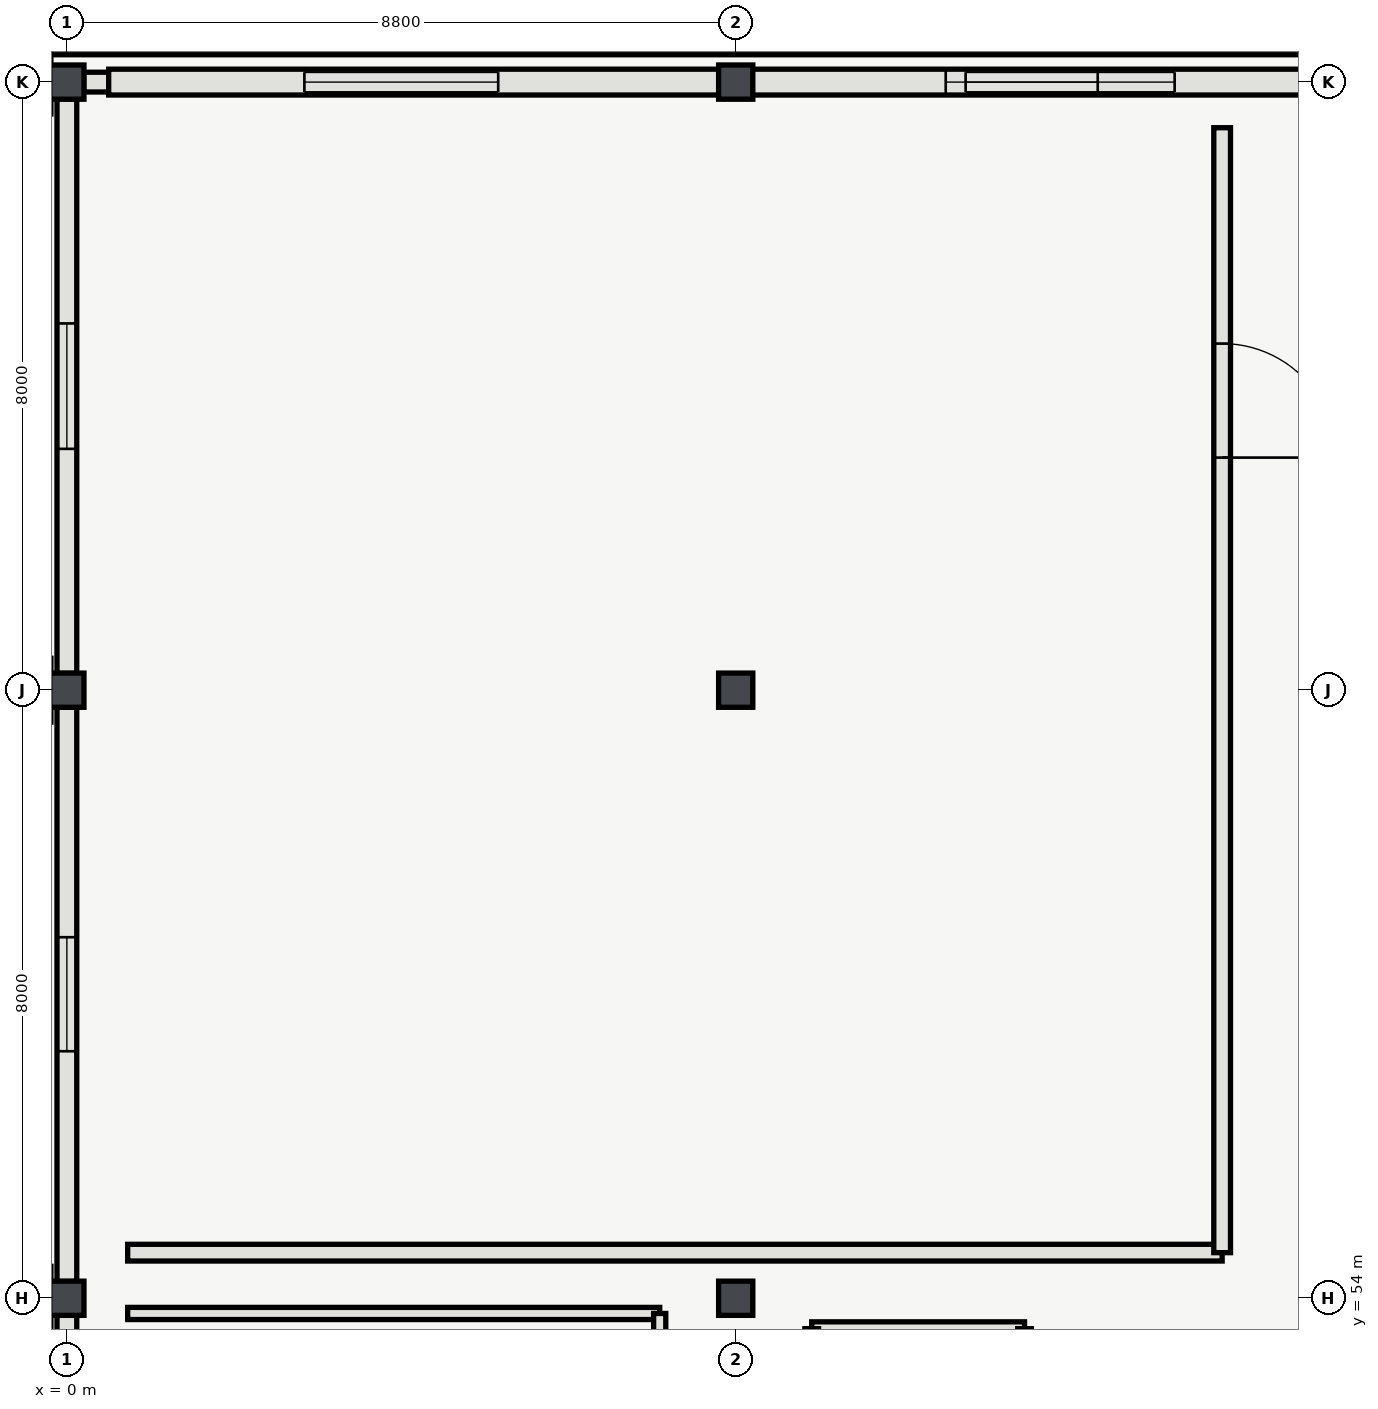
"""IFC4 building model, lengths in metres.
Left out: names, types, materials, properties, quantities, classifications, styles, units other than length and angle.
Written with IfcOpenShell. Run it as: python <this file> out.ifc"""

import sys

from ifc_helpers import new_model, si_unit, direction, frame, frame_2d, origin, origin_2d, place, context, subcontext, project, spatial, polyline, rectangle, hollow_rectangle, outline, extrude, element, fill, save


model = new_model("IFC4")
c1 = context("Model", 3, precision=1e-05, world=origin(), true_north=direction((0.0, 1.0)))
c2 = subcontext(c1, "Body", "Model", "MODEL_VIEW")
j1 = project(units=[si_unit("LENGTHUNIT", "METRE"), si_unit("PLANEANGLEUNIT", "RADIAN")], contexts=[c1])
p1 = place(None, origin())
s1 = spatial("IfcSite", under=j1, at=p1, CompositionType="ELEMENT")
p2 = place(p1, origin())
s2 = spatial("IfcBuilding", under=s1, at=p2, CompositionType="ELEMENT")
p3 = place(p2, frame((0.0, 0.0, 41.4)))
s3 = spatial("IfcBuildingStorey", under=s2, at=p3, CompositionType="ELEMENT", Elevation=41.4)
for number, where, z_axis, x_axis in (
    (1, (0.0, 54.0, 0.0), (0.0, 0.0, 1.0), (1.0, 0.0, 0.0)),
    (2, (0.0, 62.0, 0.0), (0.0, 0.0, 1.0), (1.0, 0.0, 0.0)),
    (3, (0.0, 70.0, 0.0), (0.0, 0.0, 1.0), (1.0, 0.0, 0.0)),
    (4, (8.8, 54.0, 0.0), (0.0, 0.0, 1.0), (1.0, 0.0, 0.0)),
    (5, (8.8, 62.0, 0.0), (0.0, 0.0, 1.0), (1.0, 0.0, 0.0)),
    (6, (8.8, 70.0, 0.0), (0.0, 0.0, 1.0), (1.0, 0.0, 0.0)),
):
    element("IfcColumn", number, at=place(p3, frame(where, z_axis=z_axis, x_axis=x_axis)), inside=s3, PredefinedType="COLUMN", context=c2, shape_type="SweptSolid", body=[
        extrude(hollow_rectangle(XDim=0.45, YDim=0.45, WallThickness=0.018, InnerFilletRadius=0.018, OuterFilletRadius=0.036, at=origin_2d()), origin(), (0.0, 0.0, 1.0), 4.2),
    ])
p4 = place(p3, frame((8.579, 70.0, 0.0), z_axis=(0.0, 0.0, 1.0), x_axis=(-1.0, 0.0, 0.0)))
e7 = element("IfcWall", 7, at=p4, inside=s3, PredefinedType="SOLIDWALL", context=c2, shape_type="SweptSolid", body=[
    extrude(rectangle(XDim=8.358, YDim=0.26, at=frame_2d((4.179, 0.0))), origin(), (0.0, 0.0, 1.0), 3.473),
])
p5 = place(p4, frame((2.904, 0.0, 0.95)))
e8 = element("IfcOpeningElement", 8, at=p5, cuts=e7, PredefinedType="OPENING", context=c2, shape_type="SweptSolid", body=[
    extrude(rectangle(XDim=2.55, YDim=1.95, at=frame_2d((1.275, 0.975))), frame((0.0, 0.14, 0.0), z_axis=(0.0, -1.0, 0.0), x_axis=(1.0, 0.0, 0.0)), (0.0, 0.0, 1.0), 0.28),
])
p6 = place(p3, frame((17.304, 70.0, 0.0), z_axis=(0.0, 0.0, 1.0), x_axis=(-1.0, 0.0, 0.0)))
e9 = element("IfcWall", 9, at=p6, inside=s3, PredefinedType="SOLIDWALL", context=c2, shape_type="SweptSolid", body=[
    extrude(rectangle(XDim=8.283, YDim=0.26, at=frame_2d((4.142, 0.0))), origin(), (0.0, 0.0, 1.0), 3.473),
])
p7 = place(p6, frame((2.729, 0.0, 0.95)))
e10 = element("IfcOpeningElement", 10, at=p7, cuts=e9, PredefinedType="OPENING", context=c2, shape_type="SweptSolid", body=[
    extrude(rectangle(XDim=2.75, YDim=1.95, at=frame_2d((1.375, 0.975))), frame((0.0, 0.14, 0.0), z_axis=(0.0, -1.0, 0.0), x_axis=(1.0, 0.0, 0.0)), (0.0, 0.0, 1.0), 0.28),
])
p8 = place(p3, frame((0.0, 53.779, 0.0), z_axis=(0.0, 0.0, 1.0), x_axis=(0.0, -1.0, 0.0)))
e11 = element("IfcWall", 11, at=p8, inside=s3, PredefinedType="SOLIDWALL", context=c2, shape_type="SweptSolid", body=[
    extrude(rectangle(XDim=7.558, YDim=0.26, at=frame_2d((3.779, 0.0))), origin(), (0.0, 0.0, 1.0), 3.473),
])
p9 = place(p8, frame((3.104, 0.0, 0.95)))
e12 = element("IfcOpeningElement", 12, at=p9, cuts=e11, PredefinedType="OPENING", context=c2, shape_type="SweptSolid", body=[
    extrude(rectangle(XDim=1.35, YDim=1.8, at=frame_2d((0.675, 0.9))), frame((0.0, 0.14, 0.0), z_axis=(0.0, -1.0, 0.0), x_axis=(1.0, 0.0, 0.0)), (0.0, 0.0, 1.0), 0.28),
])
p10 = place(p3, frame((0.0, 61.779, 0.0), z_axis=(0.0, 0.0, 1.0), x_axis=(0.0, -1.0, 0.0)))
e13 = element("IfcWall", 13, at=p10, inside=s3, PredefinedType="SOLIDWALL", context=c2, shape_type="SweptSolid", body=[
    extrude(rectangle(XDim=7.558, YDim=0.26, at=frame_2d((3.779, 0.0))), origin(), (0.0, 0.0, 1.0), 3.473),
])
p11 = place(p10, frame((3.029, 0.0, 0.95)))
e14 = element("IfcOpeningElement", 14, at=p11, cuts=e13, PredefinedType="OPENING", context=c2, shape_type="SweptSolid", body=[
    extrude(rectangle(XDim=1.5, YDim=1.8, at=frame_2d((0.75, 0.9))), frame((0.0, 0.14, 0.0), z_axis=(0.0, -1.0, 0.0), x_axis=(1.0, 0.0, 0.0)), (0.0, 0.0, 1.0), 0.28),
])
p12 = place(p3, frame((0.0, 69.779, 0.0), z_axis=(0.0, 0.0, 1.0), x_axis=(0.0, -1.0, 0.0)))
e15 = element("IfcWall", 15, at=p12, inside=s3, PredefinedType="SOLIDWALL", context=c2, shape_type="SweptSolid", body=[
    extrude(rectangle(XDim=7.558, YDim=0.26, at=frame_2d((3.779, 0.0))), origin(), (0.0, 0.0, 1.0), 3.473),
])
p13 = place(p12, frame((2.954, 0.0, 0.95)))
e16 = element("IfcOpeningElement", 16, at=p13, cuts=e15, PredefinedType="OPENING", context=c2, shape_type="SweptSolid", body=[
    extrude(rectangle(XDim=1.65, YDim=1.8, at=frame_2d((0.825, 0.9))), frame((0.0, 0.14, 0.0), z_axis=(0.0, -1.0, 0.0), x_axis=(1.0, 0.0, 0.0)), (0.0, 0.0, 1.0), 0.28),
])
p14 = place(p3, frame((34.65, 70.0, 4.42), z_axis=(0.0, 0.0, 1.0), x_axis=(-1.0, 0.0, 0.0)))
e17 = element("IfcWall", 17, at=p14, inside=s3, PredefinedType="SOLIDWALL", context=c2, shape_type="SweptSolid", body=[
    extrude(outline(polyline([(0.0, 0.0), (34.1, 0.0), (34.1, 0.2), (22.087, 3.0), (0.0, 0.2), (0.0, 0.0)])), frame((0.0, 0.17, 0.0), z_axis=(0.0, -1.0, 0.0), x_axis=(1.0, 0.0, 0.0)), (0.0, 0.0, 1.0), 0.34),
])
p15 = place(p14, frame((21.087, 0.0, 0.55)))
e18 = element("IfcOpeningElement", 18, at=p15, cuts=e17, PredefinedType="OPENING", context=c2, shape_type="SweptSolid", body=[
    extrude(outline(polyline([(2.0, 1.0), (1.985, 1.174), (1.94, 1.342), (1.866, 1.5), (1.766, 1.643), (1.643, 1.766), (1.5, 1.866), (1.342, 1.94), (1.174, 1.985), (1.0, 2.0), (0.826, 1.985), (0.658, 1.94), (0.5, 1.866), (0.357, 1.766), (0.234, 1.643), (0.134, 1.5), (0.06, 1.342), (0.015, 1.174), (0.0, 1.0), (0.015, 0.826), (0.06, 0.658), (0.134, 0.5), (0.234, 0.357), (0.357, 0.234), (0.5, 0.134), (0.658, 0.06), (0.826, 0.015), (1.0, 0.0), (1.174, 0.015), (1.342, 0.06), (1.5, 0.134), (1.643, 0.234), (1.766, 0.357), (1.866, 0.5), (1.94, 0.658), (1.985, 0.826), (2.0, 1.0)])), frame((0.0, 0.18, 0.0), z_axis=(0.0, -1.0, 0.0), x_axis=(1.0, 0.0, 0.0)), (0.0, 0.0, 1.0), 0.36),
])
p16 = place(p3, frame((35.54, 70.44, 0.0), z_axis=(0.0, 0.0, 1.0), x_axis=(-1.0, 0.0, 0.0)))
e19 = element("IfcWall", 19, at=p16, inside=s3, PredefinedType="SOLIDWALL", context=c2, shape_type="SweptSolid", body=[
    extrude(rectangle(XDim=35.88, YDim=0.16, at=frame_2d((17.94, 0.0))), origin(), (0.0, 0.0, 1.0), 0.58),
])
p17 = place(p3, frame((12.6, 53.6, 0.0), z_axis=(0.0, 0.0, 1.0), x_axis=(-1.0, 0.0, 0.0)))
e20 = element("IfcWall", 20, at=p17, inside=s3, PredefinedType="PLUMBINGWALL", context=c2, shape_type="SweptSolid", body=[
    extrude(rectangle(XDim=2.8, YDim=0.18, at=frame_2d((1.4, 0.0))), origin(), (0.0, 0.0, 1.0), 3.92),
])
p18 = place(p3, frame((12.6, 50.2, 0.0), z_axis=(0.0, 0.0, 1.0), x_axis=(0.0, 1.0, 0.0)))
e21 = element("IfcWall", 21, at=p18, inside=s3, PredefinedType="PLUMBINGWALL", context=c2, shape_type="SweptSolid", body=[
    extrude(rectangle(XDim=3.4, YDim=0.18, at=frame_2d((1.7, 0.0))), origin(), (0.0, 0.0, 1.0), 3.92),
])
p19 = place(p18, frame((0.3, 0.0, 0.0)))
e22 = element("IfcOpeningElement", 22, at=p19, cuts=e21, PredefinedType="OPENING", context=c2, shape_type="SweptSolid", body=[
    extrude(rectangle(XDim=0.92, YDim=2.1, at=frame_2d((0.46, 1.05))), frame((0.0, 0.1, 0.0), z_axis=(0.0, -1.0, 0.0), x_axis=(1.0, 0.0, 0.0)), (0.0, 0.0, 1.0), 0.2),
])
p20 = place(p3, frame((0.8, 54.6, 0.0), z_axis=(0.0, 0.0, 1.0), x_axis=(1.0, 0.0, 0.0)))
e23 = element("IfcWall", 23, at=p20, inside=s3, PredefinedType="PARTITIONING", context=c2, shape_type="SweptSolid", body=[
    extrude(rectangle(XDim=14.4, YDim=0.22, at=frame_2d((7.2, 0.0))), origin(), (0.0, 0.0, 1.0), 3.92),
])
p21 = place(p3, frame((15.2, 54.6, 0.0), z_axis=(0.0, 0.0, 1.0), x_axis=(0.0, 1.0, 0.0)))
e24 = element("IfcWall", 24, at=p21, inside=s3, PredefinedType="PARTITIONING", context=c2, shape_type="SweptSolid", body=[
    extrude(rectangle(XDim=14.8, YDim=0.22, at=frame_2d((7.4, 0.0))), origin(), (0.0, 0.0, 1.0), 3.92),
])
p22 = place(p21, frame((10.46, 0.0, 0.0)))
e25 = element("IfcOpeningElement", 25, at=p22, cuts=e24, PredefinedType="OPENING", context=c2, shape_type="SweptSolid", body=[
    extrude(rectangle(XDim=1.5, YDim=2.3, at=frame_2d((0.75, 1.15))), frame((0.0, 0.12, 0.0), z_axis=(0.0, -1.0, 0.0), x_axis=(1.0, 0.0, 0.0)), (0.0, 0.0, 1.0), 0.24),
])
p23 = place(p3, frame((7.8, 53.8, 0.0), z_axis=(0.0, 0.0, 1.0), x_axis=(-1.0, 0.0, 0.0)))
e26 = element("IfcWall", 26, at=p23, inside=s3, PredefinedType="PARTITIONING", context=c2, shape_type="SweptSolid", body=[
    extrude(rectangle(XDim=7.0, YDim=0.16, at=frame_2d((3.5, 0.0))), origin(), (0.0, 0.0, 1.0), 3.92),
])
p24 = place(p3, frame((7.8, 43.6, 0.0), z_axis=(0.0, 0.0, 1.0), x_axis=(0.0, 1.0, 0.0)))
e27 = element("IfcWall", 27, at=p24, inside=s3, PredefinedType="PARTITIONING", context=c2, shape_type="SweptSolid", body=[
    extrude(rectangle(XDim=10.2, YDim=0.16, at=frame_2d((5.1, 0.0))), origin(), (0.0, 0.0, 1.0), 3.92),
])
p25 = place(p24, frame((5.83, 0.0, 0.0)))
e28 = element("IfcOpeningElement", 28, at=p25, cuts=e27, PredefinedType="OPENING", context=c2, shape_type="SweptSolid", body=[
    extrude(rectangle(XDim=1.7, YDim=2.3, at=frame_2d((0.85, 1.15))), frame((0.0, 0.09, 0.0), z_axis=(0.0, -1.0, 0.0), x_axis=(1.0, 0.0, 0.0)), (0.0, 0.0, 1.0), 0.18),
])
p26 = place(p5, origin())
e29 = element("IfcWindow", 29, at=p26, inside=s3, PartitioningType="SINGLE_PANEL", PredefinedType="WINDOW", context=c2, shape_type="SweptSolid", body=[
    extrude(rectangle(XDim=2.55, YDim=1.95, at=frame_2d((1.275, 0.975))), frame((0.0, 0.03, 0.0), z_axis=(0.0, -1.0, 0.0), x_axis=(1.0, 0.0, 0.0)), (0.0, 0.0, 1.0), 0.06),
])
fill(e8, e29)
p27 = place(p7, origin())
e30 = element("IfcWindow", 30, at=p27, inside=s3, PartitioningType="SINGLE_PANEL", PredefinedType="WINDOW", context=c2, shape_type="SweptSolid", body=[
    extrude(rectangle(XDim=2.75, YDim=1.95, at=frame_2d((1.375, 0.975))), frame((0.0, 0.03, 0.0), z_axis=(0.0, -1.0, 0.0), x_axis=(1.0, 0.0, 0.0)), (0.0, 0.0, 1.0), 0.06),
])
fill(e10, e30)
p28 = place(p11, origin())
e31 = element("IfcWindow", 31, at=p28, inside=s3, PartitioningType="SINGLE_PANEL", PredefinedType="WINDOW", context=c2, shape_type="SweptSolid", body=[
    extrude(rectangle(XDim=1.5, YDim=1.8, at=frame_2d((0.75, 0.9))), frame((0.0, 0.03, 0.0), z_axis=(0.0, -1.0, 0.0), x_axis=(1.0, 0.0, 0.0)), (0.0, 0.0, 1.0), 0.06),
])
fill(e14, e31)
p29 = place(p13, origin())
e32 = element("IfcWindow", 32, at=p29, inside=s3, PartitioningType="SINGLE_PANEL", PredefinedType="WINDOW", context=c2, shape_type="SweptSolid", body=[
    extrude(rectangle(XDim=1.65, YDim=1.8, at=frame_2d((0.825, 0.9))), frame((0.0, 0.03, 0.0), z_axis=(0.0, -1.0, 0.0), x_axis=(1.0, 0.0, 0.0)), (0.0, 0.0, 1.0), 0.06),
])
fill(e16, e32)
p30 = place(p15, origin())
e33 = element("IfcWindow", 33, at=p30, inside=s3, PartitioningType="SINGLE_PANEL", PredefinedType="WINDOW", context=c2, shape_type="SweptSolid", body=[
    extrude(outline(polyline([(2.0, 1.0), (1.985, 1.174), (1.94, 1.342), (1.866, 1.5), (1.766, 1.643), (1.643, 1.766), (1.5, 1.866), (1.342, 1.94), (1.174, 1.985), (1.0, 2.0), (0.826, 1.985), (0.658, 1.94), (0.5, 1.866), (0.357, 1.766), (0.234, 1.643), (0.134, 1.5), (0.06, 1.342), (0.015, 1.174), (0.0, 1.0), (0.015, 0.826), (0.06, 0.658), (0.134, 0.5), (0.234, 0.357), (0.357, 0.234), (0.5, 0.134), (0.658, 0.06), (0.826, 0.015), (1.0, 0.0), (1.174, 0.015), (1.342, 0.06), (1.5, 0.134), (1.643, 0.234), (1.766, 0.357), (1.866, 0.5), (1.94, 0.658), (1.985, 0.826), (2.0, 1.0)])), frame((0.0, 0.04, 0.0), z_axis=(0.0, -1.0, 0.0), x_axis=(1.0, 0.0, 0.0)), (0.0, 0.0, 1.0), 0.08),
])
fill(e18, e33)
p31 = place(p22, origin())
e34 = element("IfcDoor", 34, at=p31, inside=s3, OperationType="DOUBLE_DOOR_SINGLE_SWING", PredefinedType="DOOR", context=c2, shape_type="SweptSolid", body=[
    extrude(rectangle(XDim=1.5, YDim=2.3, at=frame_2d((0.75, 1.15))), frame((0.0, 0.025, 0.0), z_axis=(0.0, -1.0, 0.0), x_axis=(1.0, 0.0, 0.0)), (0.0, 0.0, 1.0), 0.05),
])
fill(e25, e34)
save(model, sys.argv[1])
